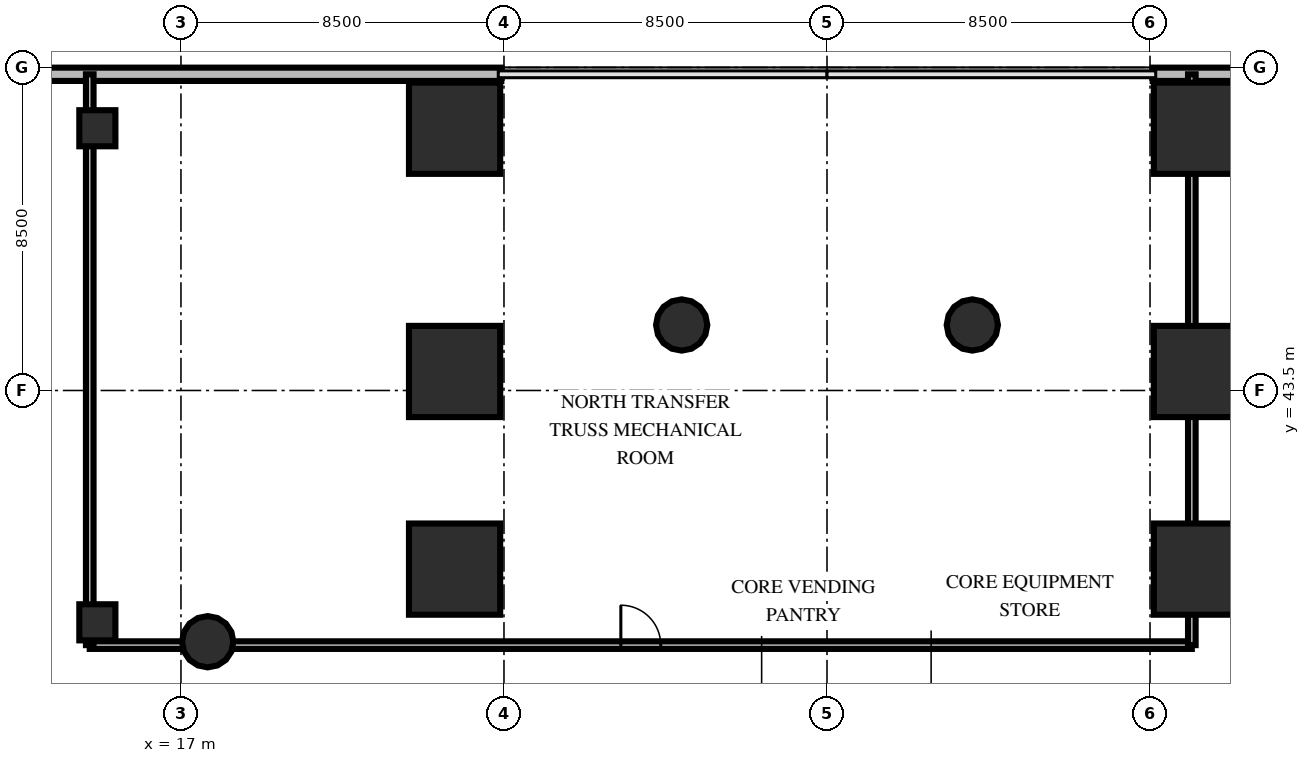
"""IFC4 building model, lengths in metres.
Left out: names, types, materials, properties, quantities, classifications, styles, units other than length and angle.
Written with IfcOpenShell. Run it as: python <this file> out.ifc"""

import sys

from ifc_helpers import new_model, si_unit, direction, frame, frame_2d, origin, origin_2d, place, context, subcontext, project, spatial, rectangle, circle, extrude, element, fill, save


model = new_model("IFC4")
c1 = context("Model", 3, precision=1e-05, world=origin(), true_north=direction((0.0, 1.0)))
c2 = subcontext(c1, "Body", "Model", "MODEL_VIEW")
j1 = project(units=[si_unit("LENGTHUNIT", "METRE"), si_unit("PLANEANGLEUNIT", "RADIAN")], contexts=[c1])
p1 = place(None, origin())
s1 = spatial("IfcSite", under=j1, at=p1, CompositionType="ELEMENT")
p2 = place(p1, origin())
s2 = spatial("IfcBuilding", under=s1, at=p2, CompositionType="ELEMENT")
p3 = place(p2, frame((0.0, 0.0, 20.4)))
s3 = spatial("IfcBuildingStorey", under=s2, at=p3, CompositionType="ELEMENT", Elevation=20.4)
for number, where, z_axis, x_axis in (
    (1, (24.2, 38.8, 0.0), (0.0, 0.0, 1.0), (1.0, 0.0, 0.0)),
    (2, (24.2, 44.0, 0.0), (0.0, 0.0, 1.0), (1.0, 0.0, 0.0)),
    (3, (24.2, 50.4, 0.0), (0.0, 0.0, 1.0), (1.0, 0.0, 0.0)),
    (4, (43.8, 38.8, 0.0), (0.0, 0.0, 1.0), (1.0, 0.0, 0.0)),
    (5, (43.8, 44.0, 0.0), (0.0, 0.0, 1.0), (1.0, 0.0, 0.0)),
    (6, (43.8, 50.4, 0.0), (0.0, 0.0, 1.0), (1.0, 0.0, 0.0)),
):
    element("IfcColumn", number, at=place(p3, frame(where, z_axis=z_axis, x_axis=x_axis)), inside=s3, PredefinedType="USERDEFINED", context=c2, shape_type="SweptSolid", body=[
        extrude(rectangle(XDim=2.4, YDim=2.4, at=origin_2d()), origin(), (0.0, 0.0, 1.0), 4.8),
    ])
for number, where, z_axis, x_axis in (
    (7, (14.8, 37.4, 0.0), (0.0, 0.0, 1.0), (1.0, 0.0, 0.0)),
    (8, (14.8, 50.4, 0.0), (0.0, 0.0, 1.0), (1.0, 0.0, 0.0)),
):
    element("IfcColumn", number, at=place(p3, frame(where, z_axis=z_axis, x_axis=x_axis)), inside=s3, PredefinedType="COLUMN", context=c2, shape_type="SweptSolid", body=[
        extrude(rectangle(XDim=0.95, YDim=0.95, at=origin_2d()), origin(), (0.0, 0.0, 1.0), 4.8),
    ])
for number, where, z_axis, x_axis in (
    (9, (37.824, 45.223, 0.0), (0.0, 0.0, 1.0), (1.0, 0.0, 0.0)),
    (10, (30.176, 45.223, 0.0), (0.0, 0.0, 1.0), (1.0, 0.0, 0.0)),
    (11, (17.703, 36.889, 0.0), (0.0, 0.0, 1.0), (1.0, 0.0, 0.0)),
):
    element("IfcColumn", number, at=place(p3, frame(where, z_axis=z_axis, x_axis=x_axis)), inside=s3, PredefinedType="COLUMN", context=c2, shape_type="SweptSolid", body=[
        extrude(circle(Radius=0.675, at=origin_2d()), origin(), (0.0, 0.0, 1.0), 4.8),
    ])
p4 = place(p3, frame((0.01, 51.82, 0.0), z_axis=(0.0, 0.0, 1.0), x_axis=(1.0, 0.0, 0.0)))
e12 = element("IfcWall", 12, at=p4, inside=s3, PredefinedType="SOLIDWALL", context=c2, shape_type="SweptSolid", body=[
    extrude(rectangle(XDim=25.42, YDim=0.35, at=frame_2d((12.71, 0.0))), origin(), (0.0, 0.0, 1.0), 3.76),
])
p5 = place(p4, frame((3.2, 0.0, 0.85)))
e13 = element("IfcOpeningElement", 13, at=p5, cuts=e12, PredefinedType="OPENING", context=c2, shape_type="SweptSolid", body=[
    extrude(rectangle(XDim=2.4, YDim=2.4, at=frame_2d((1.2, 1.2))), frame((0.0, 0.185, 0.0), z_axis=(0.0, -1.0, 0.0), x_axis=(1.0, 0.0, 0.0)), (0.0, 0.0, 1.0), 0.37),
])
p6 = place(p3, frame((42.57, 51.82, 0.0), z_axis=(0.0, 0.0, 1.0), x_axis=(1.0, 0.0, 0.0)))
e14 = element("IfcWall", 14, at=p6, inside=s3, PredefinedType="SOLIDWALL", context=c2, shape_type="SweptSolid", body=[
    extrude(rectangle(XDim=25.42, YDim=0.35, at=frame_2d((12.71, 0.0))), origin(), (0.0, 0.0, 1.0), 3.76),
])
p7 = place(p3, frame((14.6, 36.8, 0.0), z_axis=(0.0, 0.0, 1.0), x_axis=(1.0, 0.0, 0.0)))
e15 = element("IfcWall", 15, at=p7, inside=s3, PredefinedType="SOLIDWALL", context=c2, shape_type="SweptSolid", body=[
    extrude(rectangle(XDim=29.0, YDim=0.2, at=frame_2d((14.5, 0.0))), origin(), (0.0, 0.0, 1.0), 3.56),
])
p8 = place(p7, frame((13.975, 0.0, 0.0)))
e16 = element("IfcOpeningElement", 16, at=p8, cuts=e15, PredefinedType="OPENING", context=c2, shape_type="SweptSolid", body=[
    extrude(rectangle(XDim=1.05, YDim=2.15, at=frame_2d((0.525, 1.075))), frame((0.0, 0.11, 0.0), z_axis=(0.0, -1.0, 0.0), x_axis=(1.0, 0.0, 0.0)), (0.0, 0.0, 1.0), 0.22),
])
for number, where, z_axis, x_axis in (
    (17, (43.6, 36.8, 0.0), (0.0, 0.0, 1.0), (0.0, 1.0, 0.0)),
    (18, (14.6, 51.82, 0.0), (0.0, 0.0, 1.0), (0.0, -1.0, 0.0)),
):
    element("IfcWall", number, at=place(p3, frame(where, z_axis=z_axis, x_axis=x_axis)), inside=s3, PredefinedType="SOLIDWALL", context=c2, shape_type="SweptSolid", body=[
        extrude(rectangle(XDim=15.02, YDim=0.2, at=frame_2d((7.51, 0.0))), origin(), (0.0, 0.0, 1.0), 3.56),
    ])
p9 = place(p8, origin())
e19 = element("IfcDoor", 19, at=p9, inside=s3, OperationType="SINGLE_SWING_LEFT", PredefinedType="DOOR", context=c2, shape_type="SweptSolid", body=[
    extrude(rectangle(XDim=1.05, YDim=2.15, at=frame_2d((0.525, 1.075))), frame((0.0, 0.025, 0.0), z_axis=(0.0, -1.0, 0.0), x_axis=(1.0, 0.0, 0.0)), (0.0, 0.0, 1.0), 0.05),
])
fill(e16, e19)
save(model, sys.argv[1])
